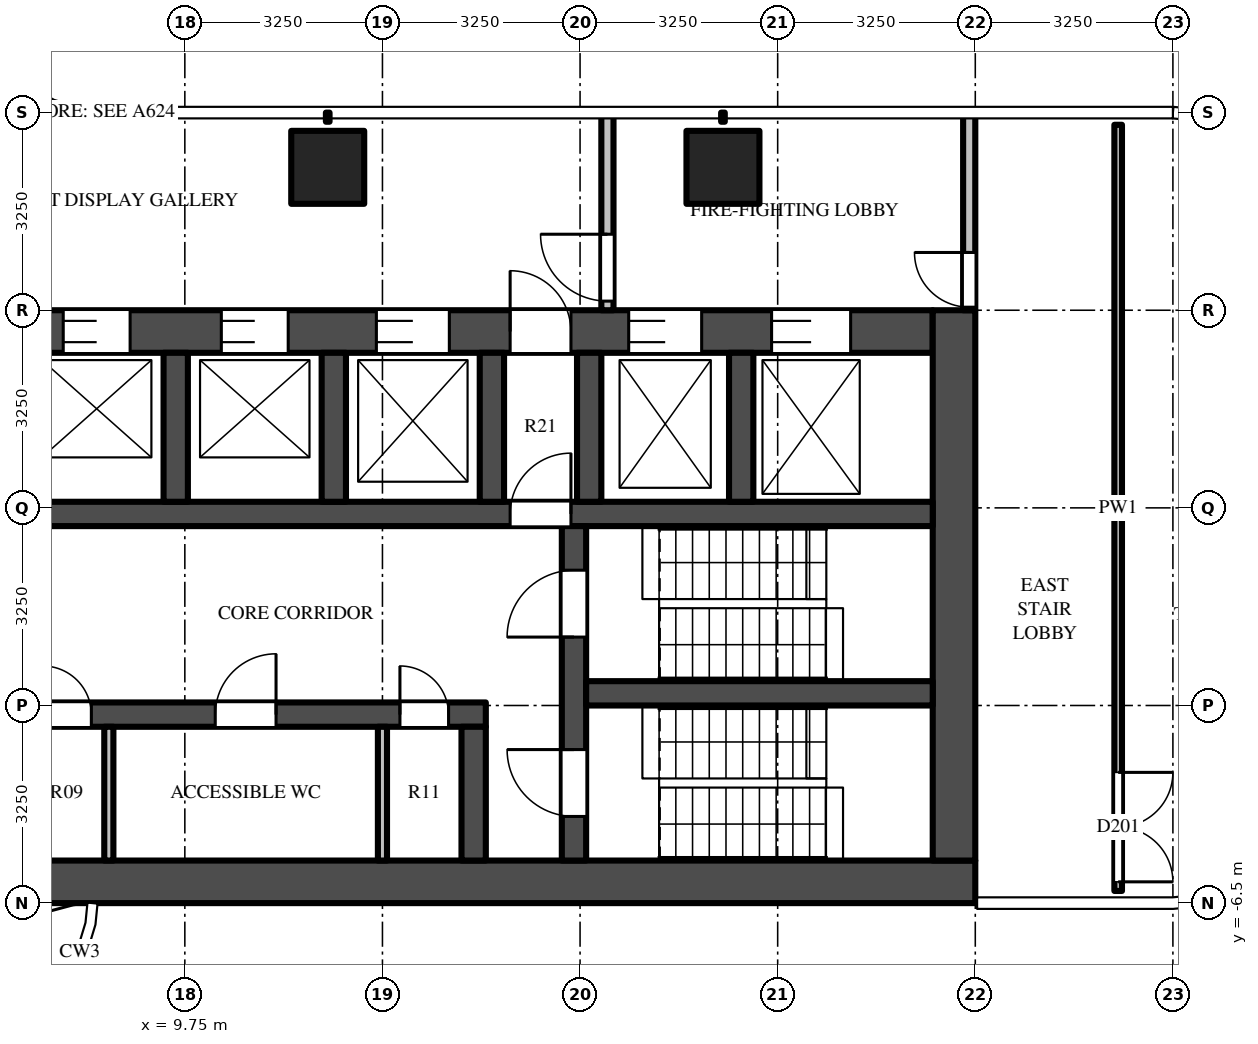
"""IFC4 building model, lengths in metres.
Left out: names, types, materials, properties, quantities, classifications, styles, units other than length and angle.
Written with IfcOpenShell. Run it as: python <this file> out.ifc"""

import sys

from ifc_helpers import new_model, si_unit, direction, frame, frame_2d, origin, origin_2d, place, context, subcontext, project, spatial, rectangle, extrude, source, transform, mapped, element, fill, save


model = new_model("IFC4")
c1 = context("Model", 3, precision=1e-05, world=origin(), true_north=direction((0.0, 1.0)))
c2 = subcontext(c1, "Body", "Model", "MODEL_VIEW")
j1 = project(units=[si_unit("LENGTHUNIT", "METRE"), si_unit("PLANEANGLEUNIT", "RADIAN")], contexts=[c1])
p1 = place(None, origin())
s1 = spatial("IfcSite", under=j1, at=p1, CompositionType="ELEMENT")
p2 = place(p1, origin())
s2 = spatial("IfcBuilding", under=s1, at=p2, CompositionType="ELEMENT")
p3 = place(p2, frame((0.0, 0.0, 197.1)))
s3 = spatial("IfcBuildingStorey", under=s2, at=p3, CompositionType="ELEMENT", Elevation=197.1)
m1 = source(origin(), c2, "Body", "SweptSolid", [
    extrude(rectangle(XDim=1.2, YDim=1.2, at=origin_2d()), origin(), (0.0, 0.0, 1.0), 3.9),
])
for number, where, z_axis, x_axis in (
    (1, (12.1, 5.6, 0.0), (0.0, 0.0, 1.0), (1.0, 0.0, 0.0)),
    (2, (18.6, 5.6, 0.0), (0.0, 0.0, 1.0), (1.0, 0.0, 0.0)),
):
    element("IfcColumn", number, at=place(p3, frame(where, z_axis=z_axis, x_axis=x_axis)), inside=s3, PredefinedType="COLUMN", context=c2, shape_type="MappedRepresentation", body=[
        mapped(m1, transform((0.0, 0.0, 0.0))),
    ])
m2 = source(origin(), c2, "Body", "SweptSolid", [
    extrude(rectangle(XDim=16.55, YDim=0.7, at=frame_2d((8.275, 0.0))), origin(), (0.0, 0.0, 1.0), 3.7),
])
p4 = place(p3, frame((6.2, -6.15, 0.0), z_axis=(0.0, 0.0, 1.0), x_axis=(1.0, 0.0, 0.0)))
e3 = element("IfcWall", 3, at=p4, inside=s3, PredefinedType="SHEAR", context=c2, shape_type="MappedRepresentation", body=[
    mapped(m2, transform((0.0, 0.0, 0.0))),
])
m3 = source(origin(), c2, "Body", "SweptSolid", [
    extrude(rectangle(XDim=14.85, YDim=0.7, at=frame_2d((7.425, 0.0))), origin(), (0.0, 0.0, 1.0), 3.7),
])
p5 = place(p3, frame((7.2, 2.9, 0.0), z_axis=(0.0, 0.0, 1.0), x_axis=(1.0, 0.0, 0.0)))
e4 = element("IfcWall", 4, at=p5, inside=s3, PredefinedType="SHEAR", context=c2, shape_type="MappedRepresentation", body=[
    mapped(m3, transform((0.0, 0.0, 0.0))),
])
m4 = source(origin(), c2, "Body", "SweptSolid", [
    extrude(rectangle(XDim=1.1, YDim=2.1, at=frame_2d((0.55, 1.05))), frame((0.0, 0.36, 0.0), z_axis=(0.0, -1.0, 0.0), x_axis=(1.0, 0.0, 0.0)), (0.0, 0.0, 1.0), 0.72),
])
p6 = place(p5, frame((0.55, 0.0, 0.0)))
e5 = element("IfcOpeningElement", 5, at=p6, cuts=e4, PredefinedType="OPENING", context=c2, shape_type="MappedRepresentation", body=[
    mapped(m4, transform((0.0, 0.0, 0.0))),
])
p7 = place(p5, frame((3.15, 0.0, 0.0)))
e6 = element("IfcOpeningElement", 6, at=p7, cuts=e4, PredefinedType="OPENING", context=c2, shape_type="MappedRepresentation", body=[
    mapped(m4, transform((0.0, 0.0, 0.0))),
])
m5 = source(origin(), c2, "Body", "SweptSolid", [
    extrude(rectangle(XDim=1.2, YDim=2.1, at=frame_2d((0.6, 1.05))), frame((0.0, 0.36, 0.0), z_axis=(0.0, -1.0, 0.0), x_axis=(1.0, 0.0, 0.0)), (0.0, 0.0, 1.0), 0.72),
])
p8 = place(p5, frame((5.7, 0.0, 0.0)))
e7 = element("IfcOpeningElement", 7, at=p8, cuts=e4, PredefinedType="OPENING", context=c2, shape_type="MappedRepresentation", body=[
    mapped(m5, transform((0.0, 0.0, 0.0))),
])
m6 = source(origin(), c2, "Body", "SweptSolid", [
    extrude(rectangle(XDim=1.3, YDim=2.1, at=frame_2d((0.65, 1.05))), frame((0.0, 0.36, 0.0), z_axis=(0.0, -1.0, 0.0), x_axis=(1.0, 0.0, 0.0)), (0.0, 0.0, 1.0), 0.72),
])
p9 = place(p5, frame((12.2, 0.0, 0.0)))
e8 = element("IfcOpeningElement", 8, at=p9, cuts=e4, PredefinedType="OPENING", context=c2, shape_type="MappedRepresentation", body=[
    mapped(m6, transform((0.0, 0.0, 0.0))),
])
p10 = place(p5, frame((9.85, 0.0, 0.0)))
e9 = element("IfcOpeningElement", 9, at=p10, cuts=e4, PredefinedType="OPENING", context=c2, shape_type="MappedRepresentation", body=[
    mapped(m5, transform((0.0, 0.0, 0.0))),
])
m7 = source(origin(), c2, "Body", "SweptSolid", [
    extrude(rectangle(XDim=1.0, YDim=2.1, at=frame_2d((0.5, 1.05))), frame((0.0, 0.36, 0.0), z_axis=(0.0, -1.0, 0.0), x_axis=(1.0, 0.0, 0.0)), (0.0, 0.0, 1.0), 0.72),
])
p11 = place(p5, frame((7.9, 0.0, 0.0)))
e10 = element("IfcOpeningElement", 10, at=p11, cuts=e4, PredefinedType="OPENING", context=c2, shape_type="MappedRepresentation", body=[
    mapped(m7, transform((0.0, 0.0, 0.0))),
])
m8 = source(origin(), c2, "Body", "SweptSolid", [
    extrude(rectangle(XDim=9.05, YDim=0.7, at=frame_2d((4.525, 0.0))), origin(), (0.0, 0.0, 1.0), 3.7),
])
p12 = place(p3, frame((22.4, -5.8, 0.0), z_axis=(0.0, 0.0, 1.0), x_axis=(0.0, 1.0, 0.0)))
e11 = element("IfcWall", 11, at=p12, inside=s3, PredefinedType="SHEAR", context=c2, shape_type="MappedRepresentation", body=[
    mapped(m8, transform((0.0, 0.0, 0.0))),
])
m9 = source(origin(), c2, "Body", "SweptSolid", [
    extrude(rectangle(XDim=7.5, YDim=0.4, at=frame_2d((3.75, 0.0))), origin(), (0.0, 0.0, 1.0), 3.7),
])
p13 = place(p3, frame((7.2, -3.4, 0.0), z_axis=(0.0, 0.0, 1.0), x_axis=(1.0, 0.0, 0.0)))
e12 = element("IfcWall", 12, at=p13, inside=s3, PredefinedType="SHEAR", context=c2, shape_type="MappedRepresentation", body=[
    mapped(m9, transform((0.0, 0.0, 0.0))),
])
m10 = source(origin(), c2, "Body", "SweptSolid", [
    extrude(rectangle(XDim=0.8, YDim=2.1, at=frame_2d((0.4, 1.05))), frame((0.0, 0.21, 0.0), z_axis=(0.0, -1.0, 0.0), x_axis=(1.0, 0.0, 0.0)), (0.0, 0.0, 1.0), 0.42),
])
p14 = place(p13, frame((0.212, 0.0, 0.0)))
e13 = element("IfcOpeningElement", 13, at=p14, cuts=e12, PredefinedType="OPENING", context=c2, shape_type="MappedRepresentation", body=[
    mapped(m10, transform((0.0, 0.0, 0.0))),
])
m11 = source(origin(), c2, "Body", "SweptSolid", [
    extrude(rectangle(XDim=1.0, YDim=2.1, at=frame_2d((0.5, 1.05))), frame((0.0, 0.21, 0.0), z_axis=(0.0, -1.0, 0.0), x_axis=(1.0, 0.0, 0.0)), (0.0, 0.0, 1.0), 0.42),
])
p15 = place(p13, frame((3.05, 0.0, 0.0)))
e14 = element("IfcOpeningElement", 14, at=p15, cuts=e12, PredefinedType="OPENING", context=c2, shape_type="MappedRepresentation", body=[
    mapped(m11, transform((0.0, 0.0, 0.0))),
])
p16 = place(p13, frame((6.087, 0.0, 0.0)))
e15 = element("IfcOpeningElement", 15, at=p16, cuts=e12, PredefinedType="OPENING", context=c2, shape_type="MappedRepresentation", body=[
    mapped(m10, transform((0.0, 0.0, 0.0))),
])
m12 = source(origin(), c2, "Body", "SweptSolid", [
    extrude(rectangle(XDim=14.85, YDim=0.4, at=frame_2d((7.425, 0.0))), origin(), (0.0, 0.0, 1.0), 3.7),
])
p17 = place(p3, frame((7.2, -0.1, 0.0), z_axis=(0.0, 0.0, 1.0), x_axis=(1.0, 0.0, 0.0)))
e16 = element("IfcWall", 16, at=p17, inside=s3, PredefinedType="SHEAR", context=c2, shape_type="MappedRepresentation", body=[
    mapped(m12, transform((0.0, 0.0, 0.0))),
])
p18 = place(p17, frame((7.9, 0.0, 0.0)))
e17 = element("IfcOpeningElement", 17, at=p18, cuts=e16, PredefinedType="OPENING", context=c2, shape_type="MappedRepresentation", body=[
    mapped(m11, transform((0.0, 0.0, 0.0))),
])
m13 = source(origin(), c2, "Body", "SweptSolid", [
    extrude(rectangle(XDim=5.5, YDim=0.4, at=frame_2d((2.75, 0.0))), origin(), (0.0, 0.0, 1.0), 3.7),
])
p19 = place(p3, frame((16.15, -5.8, 0.0), z_axis=(0.0, 0.0, 1.0), x_axis=(0.0, 1.0, 0.0)))
e18 = element("IfcWall", 18, at=p19, inside=s3, PredefinedType="SHEAR", context=c2, shape_type="MappedRepresentation", body=[
    mapped(m13, transform((0.0, 0.0, 0.0))),
])
m14 = source(origin(), c2, "Body", "SweptSolid", [
    extrude(rectangle(XDim=1.1, YDim=2.1, at=frame_2d((0.55, 1.05))), frame((0.0, 0.21, 0.0), z_axis=(0.0, -1.0, 0.0), x_axis=(1.0, 0.0, 0.0)), (0.0, 0.0, 1.0), 0.42),
])
p20 = place(p19, frame((0.725, 0.0, 0.0)))
e19 = element("IfcOpeningElement", 19, at=p20, cuts=e18, PredefinedType="OPENING", context=c2, shape_type="MappedRepresentation", body=[
    mapped(m14, transform((0.0, 0.0, 0.0))),
])
p21 = place(p19, frame((3.675, 0.0, 0.0)))
e20 = element("IfcOpeningElement", 20, at=p21, cuts=e18, PredefinedType="OPENING", context=c2, shape_type="MappedRepresentation", body=[
    mapped(m14, transform((0.0, 0.0, 0.0))),
])
m15 = source(origin(), c2, "Body", "SweptSolid", [
    extrude(rectangle(XDim=5.7, YDim=0.4, at=frame_2d((2.85, 0.0))), origin(), (0.0, 0.0, 1.0), 3.7),
])
p22 = place(p3, frame((16.35, -3.05, 0.0), z_axis=(0.0, 0.0, 1.0), x_axis=(1.0, 0.0, 0.0)))
e21 = element("IfcWall", 21, at=p22, inside=s3, PredefinedType="SHEAR", context=c2, shape_type="MappedRepresentation", body=[
    mapped(m15, transform((0.0, 0.0, 0.0))),
])
m16 = source(origin(), c2, "Body", "SweptSolid", [
    extrude(rectangle(XDim=2.2, YDim=0.4, at=frame_2d((1.1, 0.0))), origin(), (0.0, 0.0, 1.0), 3.7),
])
p23 = place(p3, frame((14.5, -5.8, 0.0), z_axis=(0.0, 0.0, 1.0), x_axis=(0.0, 1.0, 0.0)))
e22 = element("IfcWall", 22, at=p23, inside=s3, PredefinedType="SHEAR", context=c2, shape_type="MappedRepresentation", body=[
    mapped(m16, transform((0.0, 0.0, 0.0))),
])
m17 = source(origin(), c2, "Body", "SweptSolid", [
    extrude(rectangle(XDim=2.45, YDim=0.4, at=frame_2d((1.225, 0.0))), origin(), (0.0, 0.0, 1.0), 3.7),
])
for number, where, z_axis, x_axis in (
    (23, (9.6, 0.1, 0.0), (0.0, 0.0, 1.0), (0.0, 1.0, 0.0)),
    (24, (12.2, 0.1, 0.0), (0.0, 0.0, 1.0), (0.0, 1.0, 0.0)),
    (25, (14.8, 0.1, 0.0), (0.0, 0.0, 1.0), (0.0, 1.0, 0.0)),
    (26, (16.4, 0.1, 0.0), (0.0, 0.0, 1.0), (0.0, 1.0, 0.0)),
    (27, (18.9, 0.1, 0.0), (0.0, 0.0, 1.0), (0.0, 1.0, 0.0)),
):
    element("IfcWall", number, at=place(p3, frame(where, z_axis=z_axis, x_axis=x_axis)), inside=s3, PredefinedType="SHEAR", context=c2, shape_type="MappedRepresentation", body=[
        mapped(m17, transform((0.0, 0.0, 0.0))),
    ])
m18 = source(origin(), c2, "Body", "SweptSolid", [
    extrude(rectangle(XDim=3.25, YDim=0.2, at=frame_2d((1.625, 0.0))), origin(), (0.0, 0.0, 1.0), 3.7),
])
p24 = place(p3, frame((16.7, 3.25, 0.0), z_axis=(0.0, 0.0, 1.0), x_axis=(0.0, 1.0, 0.0)))
e28 = element("IfcWall", 28, at=p24, inside=s3, PredefinedType="PARTITIONING", context=c2, shape_type="MappedRepresentation", body=[
    mapped(m18, transform((0.0, 0.0, 0.0))),
])
m19 = source(origin(), c2, "Body", "SweptSolid", [
    extrude(rectangle(XDim=1.1, YDim=2.1, at=frame_2d((0.55, 1.05))), frame((0.0, 0.11, 0.0), z_axis=(0.0, -1.0, 0.0), x_axis=(1.0, 0.0, 0.0)), (0.0, 0.0, 1.0), 0.22),
])
p25 = place(p24, frame((0.15, 0.0, 0.0)))
e29 = element("IfcOpeningElement", 29, at=p25, cuts=e28, PredefinedType="OPENING", context=c2, shape_type="MappedRepresentation", body=[
    mapped(m19, transform((0.0, 0.0, 0.0))),
])
p26 = place(p3, frame((22.65, 3.25, 0.0), z_axis=(0.0, 0.0, 1.0), x_axis=(0.0, 1.0, 0.0)))
e30 = element("IfcWall", 30, at=p26, inside=s3, PredefinedType="PARTITIONING", context=c2, shape_type="MappedRepresentation", body=[
    mapped(m18, transform((0.0, 0.0, 0.0))),
])
m20 = source(origin(), c2, "Body", "SweptSolid", [
    extrude(rectangle(XDim=0.9, YDim=2.1, at=frame_2d((0.45, 1.05))), frame((0.0, 0.11, 0.0), z_axis=(0.0, -1.0, 0.0), x_axis=(1.0, 0.0, 0.0)), (0.0, 0.0, 1.0), 0.22),
])
p27 = place(p26, frame((0.05, 0.0, 0.0)))
e31 = element("IfcOpeningElement", 31, at=p27, cuts=e30, PredefinedType="OPENING", context=c2, shape_type="MappedRepresentation", body=[
    mapped(m20, transform((0.0, 0.0, 0.0))),
])
m21 = source(origin(), c2, "Body", "SweptSolid", [
    extrude(rectangle(XDim=2.2, YDim=0.15, at=frame_2d((1.1, 0.0))), origin(), (0.0, 0.0, 1.0), 3.7),
])
for number, where, z_axis, x_axis in (
    (32, (8.5, -5.8, 0.0), (0.0, 0.0, 1.0), (0.0, 1.0, 0.0)),
    (33, (13.0, -5.8, 0.0), (0.0, 0.0, 1.0), (0.0, 1.0, 0.0)),
):
    element("IfcWall", number, at=place(p3, frame(where, z_axis=z_axis, x_axis=x_axis)), inside=s3, PredefinedType="PARTITIONING", context=c2, shape_type="MappedRepresentation", body=[
        mapped(m21, transform((0.0, 0.0, 0.0))),
    ])
m22 = source(origin(), c2, "Body", "SweptSolid", [
    extrude(rectangle(XDim=12.6, YDim=0.125, at=frame_2d((6.3, 0.0))), origin(), (0.0, 0.0, 1.0), 2.78),
])
p28 = place(p3, frame((25.1, 6.3, 0.0), z_axis=(0.0, 0.0, 1.0), x_axis=(0.0, -1.0, 0.0)))
e34 = element("IfcWall", 34, at=p28, inside=s3, PredefinedType="PARTITIONING", context=c2, shape_type="MappedRepresentation", body=[
    mapped(m22, transform((0.0, 0.0, 0.0))),
])
m23 = source(origin(), c2, "Body", "SweptSolid", [
    extrude(rectangle(XDim=1.8, YDim=2.1, at=frame_2d((0.9, 1.05))), frame((0.0, 0.073, 0.0), z_axis=(0.0, -1.0, 0.0), x_axis=(1.0, 0.0, 0.0)), (0.0, 0.0, 1.0), 0.145),
])
p29 = place(p28, frame((10.65, 0.0, 0.0)))
e35 = element("IfcOpeningElement", 35, at=p29, cuts=e34, PredefinedType="OPENING", context=c2, shape_type="MappedRepresentation", body=[
    mapped(m23, transform((0.0, 0.0, 0.0))),
])
m24 = source(origin(), c2, "Body", "SweptSolid", [
    extrude(rectangle(XDim=1.1, YDim=2.1, at=frame_2d((0.55, 1.05))), frame((0.0, -0.275, 0.0), z_axis=(0.0, -1.0, 0.0), x_axis=(1.0, 0.0, 0.0)), (0.0, 0.0, 1.0), 0.05),
])
p30 = place(p6, origin())
e36 = element("IfcDoor", 36, at=p30, inside=s3, OperationType="DOUBLE_DOOR_SLIDING", PredefinedType="DOOR", context=c2, shape_type="MappedRepresentation", body=[
    mapped(m24, transform((0.0, 0.0, 0.0))),
])
fill(e5, e36)
p31 = place(p7, origin())
e37 = element("IfcDoor", 37, at=p31, inside=s3, OperationType="DOUBLE_DOOR_SLIDING", PredefinedType="DOOR", context=c2, shape_type="MappedRepresentation", body=[
    mapped(m24, transform((0.0, 0.0, 0.0))),
])
fill(e6, e37)
m25 = source(origin(), c2, "Body", "SweptSolid", [
    extrude(rectangle(XDim=1.2, YDim=2.1, at=frame_2d((0.6, 1.05))), frame((0.0, -0.275, 0.0), z_axis=(0.0, -1.0, 0.0), x_axis=(1.0, 0.0, 0.0)), (0.0, 0.0, 1.0), 0.05),
])
p32 = place(p8, origin())
e38 = element("IfcDoor", 38, at=p32, inside=s3, OperationType="DOUBLE_DOOR_SLIDING", PredefinedType="DOOR", context=c2, shape_type="MappedRepresentation", body=[
    mapped(m25, transform((0.0, 0.0, 0.0))),
])
fill(e7, e38)
m26 = source(origin(), c2, "Body", "SweptSolid", [
    extrude(rectangle(XDim=1.3, YDim=2.1, at=frame_2d((0.65, 1.05))), frame((0.0, -0.275, 0.0), z_axis=(0.0, -1.0, 0.0), x_axis=(1.0, 0.0, 0.0)), (0.0, 0.0, 1.0), 0.05),
])
p33 = place(p9, origin())
e39 = element("IfcDoor", 39, at=p33, inside=s3, OperationType="DOUBLE_DOOR_SLIDING", PredefinedType="DOOR", context=c2, shape_type="MappedRepresentation", body=[
    mapped(m26, transform((0.0, 0.0, 0.0))),
])
fill(e8, e39)
p34 = place(p10, origin())
e40 = element("IfcDoor", 40, at=p34, inside=s3, OperationType="DOUBLE_DOOR_SLIDING", PredefinedType="DOOR", context=c2, shape_type="MappedRepresentation", body=[
    mapped(m25, transform((0.0, 0.0, 0.0))),
])
fill(e9, e40)
m27 = source(origin(), c2, "Body", "SweptSolid", [
    extrude(rectangle(XDim=1.1, YDim=2.1, at=frame_2d((0.55, 1.05))), frame((0.0, 0.025, 0.0), z_axis=(0.0, -1.0, 0.0), x_axis=(1.0, 0.0, 0.0)), (0.0, 0.0, 1.0), 0.05),
])
p35 = place(p20, origin())
e41 = element("IfcDoor", 41, at=p35, inside=s3, OperationType="SINGLE_SWING_RIGHT", PredefinedType="DOOR", context=c2, shape_type="MappedRepresentation", body=[
    mapped(m27, transform((0.0, 0.0, 0.0))),
])
fill(e19, e41)
p36 = place(p21, origin())
e42 = element("IfcDoor", 42, at=p36, inside=s3, OperationType="SINGLE_SWING_LEFT", PredefinedType="DOOR", context=c2, shape_type="MappedRepresentation", body=[
    mapped(m27, transform((0.0, 0.0, 0.0))),
])
fill(e20, e42)
m28 = source(origin(), c2, "Body", "SweptSolid", [
    extrude(rectangle(XDim=1.0, YDim=2.1, at=frame_2d((0.5, 1.05))), frame((0.0, 0.025, 0.0), z_axis=(0.0, -1.0, 0.0), x_axis=(1.0, 0.0, 0.0)), (0.0, 0.0, 1.0), 0.05),
])
p37 = place(p18, origin())
e43 = element("IfcDoor", 43, at=p37, inside=s3, OperationType="SINGLE_SWING_RIGHT", PredefinedType="DOOR", context=c2, shape_type="MappedRepresentation", body=[
    mapped(m28, transform((0.0, 0.0, 0.0))),
])
fill(e17, e43)
m29 = source(origin(), c2, "Body", "SweptSolid", [
    extrude(rectangle(XDim=1.0, YDim=2.1, at=frame_2d((0.5, 1.05))), frame((0.0, -0.275, 0.0), z_axis=(0.0, -1.0, 0.0), x_axis=(1.0, 0.0, 0.0)), (0.0, 0.0, 1.0), 0.05),
])
p38 = place(p11, origin())
e44 = element("IfcDoor", 44, at=p38, inside=s3, OperationType="SINGLE_SWING_LEFT", PredefinedType="DOOR", context=c2, shape_type="MappedRepresentation", body=[
    mapped(m29, transform((0.0, 0.0, 0.0))),
])
fill(e10, e44)
p39 = place(p25, origin())
e45 = element("IfcDoor", 45, at=p39, inside=s3, OperationType="SINGLE_SWING_RIGHT", PredefinedType="DOOR", context=c2, shape_type="MappedRepresentation", body=[
    mapped(m27, transform((0.0, 0.0, 0.0))),
])
fill(e29, e45)
m30 = source(origin(), c2, "Body", "SweptSolid", [
    extrude(rectangle(XDim=0.9, YDim=2.1, at=frame_2d((0.45, 1.05))), frame((0.0, 0.025, 0.0), z_axis=(0.0, -1.0, 0.0), x_axis=(1.0, 0.0, 0.0)), (0.0, 0.0, 1.0), 0.05),
])
p40 = place(p27, origin())
e46 = element("IfcDoor", 46, at=p40, inside=s3, OperationType="SINGLE_SWING_RIGHT", PredefinedType="DOOR", context=c2, shape_type="MappedRepresentation", body=[
    mapped(m30, transform((0.0, 0.0, 0.0))),
])
fill(e31, e46)
m31 = source(origin(), c2, "Body", "SweptSolid", [
    extrude(rectangle(XDim=0.8, YDim=2.1, at=frame_2d((0.4, 1.05))), frame((0.0, 0.025, 0.0), z_axis=(0.0, -1.0, 0.0), x_axis=(1.0, 0.0, 0.0)), (0.0, 0.0, 1.0), 0.05),
])
p41 = place(p14, origin())
e47 = element("IfcDoor", 47, at=p41, inside=s3, OperationType="SINGLE_SWING_LEFT", PredefinedType="DOOR", context=c2, shape_type="MappedRepresentation", body=[
    mapped(m31, transform((0.0, 0.0, 0.0))),
])
fill(e13, e47)
p42 = place(p15, origin())
e48 = element("IfcDoor", 48, at=p42, inside=s3, OperationType="SINGLE_SWING_RIGHT", PredefinedType="DOOR", context=c2, shape_type="MappedRepresentation", body=[
    mapped(m28, transform((0.0, 0.0, 0.0))),
])
fill(e14, e48)
p43 = place(p16, origin())
e49 = element("IfcDoor", 49, at=p43, inside=s3, OperationType="SINGLE_SWING_LEFT", PredefinedType="DOOR", context=c2, shape_type="MappedRepresentation", body=[
    mapped(m31, transform((0.0, 0.0, 0.0))),
])
fill(e15, e49)
m32 = source(origin(), c2, "Body", "SweptSolid", [
    extrude(rectangle(XDim=1.8, YDim=2.1, at=frame_2d((0.9, 1.05))), frame((0.0, 0.025, 0.0), z_axis=(0.0, -1.0, 0.0), x_axis=(1.0, 0.0, 0.0)), (0.0, 0.0, 1.0), 0.05),
])
p44 = place(p29, origin())
e50 = element("IfcDoor", 50, at=p44, inside=s3, OperationType="DOUBLE_DOOR_SINGLE_SWING", PredefinedType="DOOR", context=c2, shape_type="MappedRepresentation", body=[
    mapped(m32, transform((0.0, 0.0, 0.0))),
])
fill(e35, e50)
save(model, sys.argv[1])
